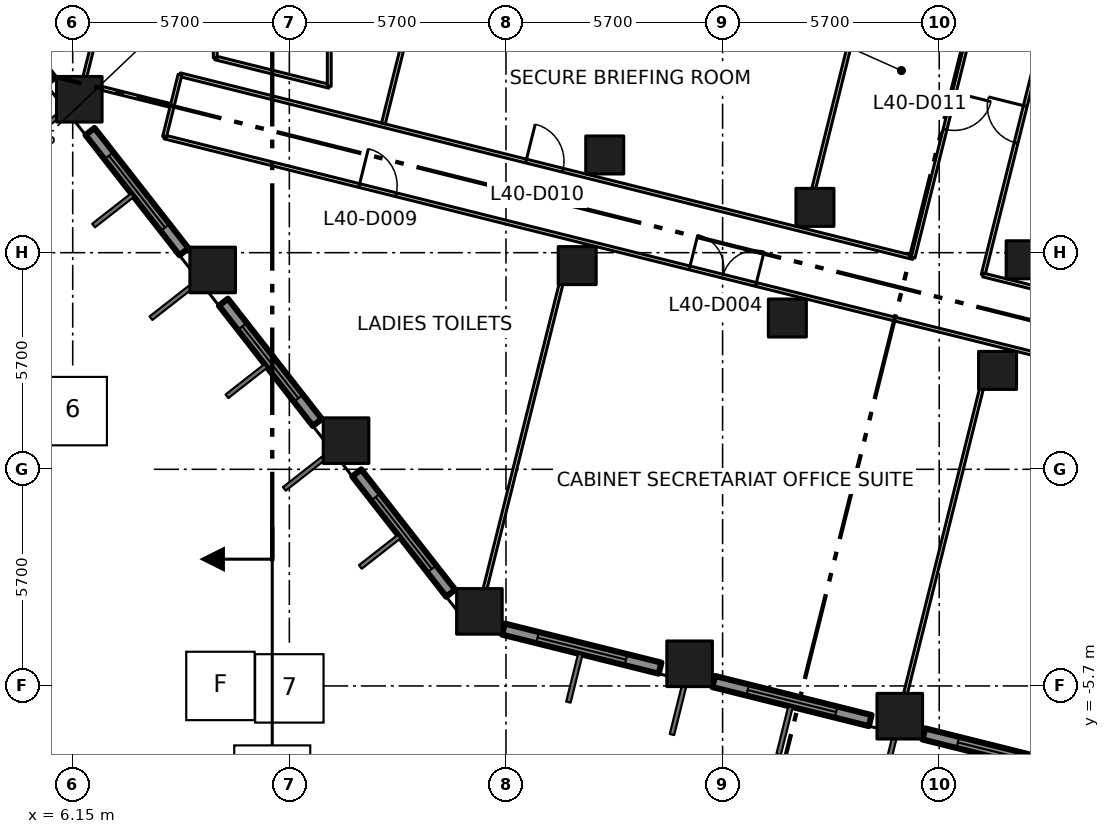
"""IFC4 building model, lengths in metres.
Left out: names, types, materials, properties, quantities, classifications, styles, units other than length and angle.
Written with IfcOpenShell. Run it as: python <this file> out.ifc"""

import sys

from ifc_helpers import new_model, si_unit, direction, frame, frame_2d, origin, origin_2d, place, context, subcontext, project, spatial, rectangle, extrude, element, fill, save


model = new_model("IFC4")
c1 = context("Model", 3, precision=1e-05, world=origin(), true_north=direction((0.0, 1.0)))
c2 = subcontext(c1, "Body", "Model", "MODEL_VIEW")
j1 = project(units=[si_unit("LENGTHUNIT", "METRE"), si_unit("PLANEANGLEUNIT", "RADIAN")], contexts=[c1])
p1 = place(None, origin())
s1 = spatial("IfcSite", under=j1, at=p1, CompositionType="ELEMENT")
p2 = place(p1, origin())
s2 = spatial("IfcBuilding", under=s1, at=p2, CompositionType="ELEMENT")
p3 = place(p2, frame((0.0, 0.0, 178.2)))
s3 = spatial("IfcBuildingStorey", under=s2, at=p3, CompositionType="ELEMENT", Elevation=178.2)
for number, where, z_axis, x_axis in (
    (1, (16.851, -3.738, 0.0), (0.0, 0.0, 1.0), (1.0, 0.0, 0.0)),
    (2, (13.342, 0.754, 0.0), (0.0, 0.0, 1.0), (1.0, 0.0, 0.0)),
    (3, (9.833, 5.245, 0.0), (0.0, 0.0, 1.0), (1.0, 0.0, 0.0)),
    (4, (6.323, 9.737, 0.0), (0.0, 0.0, 1.0), (1.0, 0.0, 0.0)),
    (5, (22.382, -5.117, 0.0), (0.0, 0.0, 1.0), (1.0, 0.0, 0.0)),
    (6, (27.912, -6.496, 0.0), (0.0, 0.0, 1.0), (1.0, 0.0, 0.0)),
):
    element("IfcColumn", number, at=place(p3, frame(where, z_axis=z_axis, x_axis=x_axis)), inside=s3, PredefinedType="COLUMN", context=c2, shape_type="SweptSolid", body=[
        extrude(rectangle(XDim=1.2, YDim=1.2, at=origin_2d()), origin(), (0.0, 0.0, 1.0), 4.2),
    ])
for number, where, z_axis, x_axis in (
    (7, (19.424, 5.36, 0.0), (0.0, 0.0, 1.0), (1.0, 0.0, 0.0)),
    (8, (24.954, 3.981, 0.0), (0.0, 0.0, 1.0), (1.0, 0.0, 0.0)),
    (9, (30.485, 2.602, 0.0), (0.0, 0.0, 1.0), (1.0, 0.0, 0.0)),
    (10, (20.149, 8.271, 0.0), (0.0, 0.0, 1.0), (1.0, 0.0, 0.0)),
    (11, (25.68, 6.892, 0.0), (0.0, 0.0, 1.0), (1.0, 0.0, 0.0)),
    (12, (31.211, 5.513, 0.0), (0.0, 0.0, 1.0), (1.0, 0.0, 0.0)),
):
    element("IfcColumn", number, at=place(p3, frame(where, z_axis=z_axis, x_axis=x_axis)), inside=s3, PredefinedType="COLUMN", context=c2, shape_type="SweptSolid", body=[
        extrude(rectangle(XDim=1.0, YDim=1.0, at=origin_2d()), origin(), (0.0, 0.0, 1.0), 4.2),
    ])
p4 = place(p3, frame((3.096, 13.381, 0.0), z_axis=(0.0, 0.0, 1.0), x_axis=(0.615563820493, -0.78808704018, 0.0)))
e13 = element("IfcWall", 13, at=p4, inside=s3, PredefinedType="SOLIDWALL", context=c2, shape_type="SweptSolid", body=[
    extrude(rectangle(XDim=4.016, YDim=0.3, at=frame_2d((2.008, 0.0))), origin(), (0.0, 0.0, 1.0), 3.15),
])
p5 = place(p4, frame((0.808, 0.0, 0.8)))
e14 = element("IfcOpeningElement", 14, at=p5, cuts=e13, PredefinedType="OPENING", context=c2, shape_type="SweptSolid", body=[
    extrude(rectangle(XDim=2.4, YDim=2.1, at=frame_2d((1.2, 1.05))), frame((0.0, 0.16, 0.0), z_axis=(0.0, -1.0, 0.0), x_axis=(1.0, 0.0, 0.0)), (0.0, 0.0, 1.0), 0.32),
])
p6 = place(p3, frame((6.605, 8.889, 0.0), z_axis=(0.0, 0.0, 1.0), x_axis=(0.615706559089, -0.787975528233, 0.0)))
e15 = element("IfcWall", 15, at=p6, inside=s3, PredefinedType="SOLIDWALL", context=c2, shape_type="SweptSolid", body=[
    extrude(rectangle(XDim=4.016, YDim=0.3, at=frame_2d((2.008, 0.0))), origin(), (0.0, 0.0, 1.0), 3.15),
])
p7 = place(p6, frame((0.808, 0.0, 0.8)))
e16 = element("IfcOpeningElement", 16, at=p7, cuts=e15, PredefinedType="OPENING", context=c2, shape_type="SweptSolid", body=[
    extrude(rectangle(XDim=2.4, YDim=2.1, at=frame_2d((1.2, 1.05))), frame((0.0, 0.16, 0.0), z_axis=(0.0, -1.0, 0.0), x_axis=(1.0, 0.0, 0.0)), (0.0, 0.0, 1.0), 0.32),
])
p8 = place(p3, frame((10.115, 4.397, 0.0), z_axis=(0.0, 0.0, 1.0), x_axis=(0.615644041972, -0.788024373725, 0.0)))
e17 = element("IfcWall", 17, at=p8, inside=s3, PredefinedType="SOLIDWALL", context=c2, shape_type="SweptSolid", body=[
    extrude(rectangle(XDim=4.015, YDim=0.3, at=frame_2d((2.008, 0.0))), origin(), (0.0, 0.0, 1.0), 3.15),
])
p9 = place(p8, frame((0.807, 0.0, 0.8)))
e18 = element("IfcOpeningElement", 18, at=p9, cuts=e17, PredefinedType="OPENING", context=c2, shape_type="SweptSolid", body=[
    extrude(rectangle(XDim=2.4, YDim=2.1, at=frame_2d((1.2, 1.05))), frame((0.0, 0.16, 0.0), z_axis=(0.0, -1.0, 0.0), x_axis=(1.0, 0.0, 0.0)), (0.0, 0.0, 1.0), 0.32),
])
p10 = place(p3, frame((13.624, -0.094, 0.0), z_axis=(0.0, 0.0, 1.0), x_axis=(0.615526062586, -0.7881165309, 0.0)))
e19 = element("IfcWall", 19, at=p10, inside=s3, PredefinedType="SOLIDWALL", context=c2, shape_type="SweptSolid", body=[
    extrude(rectangle(XDim=4.016, YDim=0.3, at=frame_2d((2.008, 0.0))), origin(), (0.0, 0.0, 1.0), 3.15),
])
p11 = place(p10, frame((0.808, 0.0, 0.8)))
e20 = element("IfcOpeningElement", 20, at=p11, cuts=e19, PredefinedType="OPENING", context=c2, shape_type="SweptSolid", body=[
    extrude(rectangle(XDim=2.4, YDim=2.1, at=frame_2d((1.2, 1.05))), frame((0.0, 0.16, 0.0), z_axis=(0.0, -1.0, 0.0), x_axis=(1.0, 0.0, 0.0)), (0.0, 0.0, 1.0), 0.32),
])
p12 = place(p3, frame((17.484, -4.205, 0.0), z_axis=(0.0, 0.0, 1.0), x_axis=(0.970318118028, -0.241832069473, 0.0)))
e21 = element("IfcWall", 21, at=p12, inside=s3, PredefinedType="SOLIDWALL", context=c2, shape_type="SweptSolid", body=[
    extrude(rectangle(XDim=4.246, YDim=0.3, at=frame_2d((2.123, 0.0))), origin(), (0.0, 0.0, 1.0), 3.15),
])
p13 = place(p12, frame((0.923, 0.0, 0.8)))
e22 = element("IfcOpeningElement", 22, at=p13, cuts=e21, PredefinedType="OPENING", context=c2, shape_type="SweptSolid", body=[
    extrude(rectangle(XDim=2.4, YDim=2.1, at=frame_2d((1.2, 1.05))), frame((0.0, 0.16, 0.0), z_axis=(0.0, -1.0, 0.0), x_axis=(1.0, 0.0, 0.0)), (0.0, 0.0, 1.0), 0.32),
])
p14 = place(p3, frame((23.015, -5.584, 0.0), z_axis=(0.0, 0.0, 1.0), x_axis=(0.970291164166, -0.241940192487, 0.0)))
e23 = element("IfcWall", 23, at=p14, inside=s3, PredefinedType="SOLIDWALL", context=c2, shape_type="SweptSolid", body=[
    extrude(rectangle(XDim=4.245, YDim=0.3, at=frame_2d((2.123, 0.0))), origin(), (0.0, 0.0, 1.0), 3.15),
])
p15 = place(p14, frame((0.922, 0.0, 0.8)))
e24 = element("IfcOpeningElement", 24, at=p15, cuts=e23, PredefinedType="OPENING", context=c2, shape_type="SweptSolid", body=[
    extrude(rectangle(XDim=2.4, YDim=2.1, at=frame_2d((1.2, 1.05))), frame((0.0, 0.16, 0.0), z_axis=(0.0, -1.0, 0.0), x_axis=(1.0, 0.0, 0.0)), (0.0, 0.0, 1.0), 0.32),
])
p16 = place(p3, frame((28.545, -6.963, 0.0), z_axis=(0.0, 0.0, 1.0), x_axis=(0.97030462482, -0.241886202691, 0.0)))
e25 = element("IfcWall", 25, at=p16, inside=s3, PredefinedType="SOLIDWALL", context=c2, shape_type="SweptSolid", body=[
    extrude(rectangle(XDim=4.246, YDim=0.3, at=frame_2d((2.123, 0.0))), origin(), (0.0, 0.0, 1.0), 3.15),
])
p17 = place(p16, frame((0.923, 0.0, 0.8)))
e26 = element("IfcOpeningElement", 26, at=p17, cuts=e25, PredefinedType="OPENING", context=c2, shape_type="SweptSolid", body=[
    extrude(rectangle(XDim=2.4, YDim=2.1, at=frame_2d((1.2, 1.05))), frame((0.0, 0.16, 0.0), z_axis=(0.0, -1.0, 0.0), x_axis=(1.0, 0.0, 0.0)), (0.0, 0.0, 1.0), 0.32),
])
p18 = place(p3, frame((8.565, 8.744, 0.0), z_axis=(0.0, 0.0, 1.0), x_axis=(0.97029693432, -0.24191705035, 0.0)))
e27 = element("IfcWall", 27, at=p18, inside=s3, PredefinedType="PARTITIONING", context=c2, shape_type="SweptSolid", body=[
    extrude(rectangle(XDim=56.375, YDim=0.1, at=frame_2d((28.187, 0.0))), origin(), (0.0, 0.0, 1.0), 3.9),
])
p19 = place(p18, frame((42.739, 0.0, 0.0)))
e28 = element("IfcOpeningElement", 28, at=p19, cuts=e27, PredefinedType="OPENING", context=c2, shape_type="SweptSolid", body=[
    extrude(rectangle(XDim=1.8, YDim=2.1, at=frame_2d((0.9, 1.05))), frame((0.0, 0.06, 0.0), z_axis=(0.0, -1.0, 0.0), x_axis=(1.0, 0.0, 0.0)), (0.0, 0.0, 1.0), 0.12),
])
p20 = place(p18, frame((14.239, 0.0, 0.0)))
e29 = element("IfcOpeningElement", 29, at=p20, cuts=e27, PredefinedType="OPENING", context=c2, shape_type="SweptSolid", body=[
    extrude(rectangle(XDim=1.8, YDim=2.1, at=frame_2d((0.9, 1.05))), frame((0.0, 0.06, 0.0), z_axis=(0.0, -1.0, 0.0), x_axis=(1.0, 0.0, 0.0)), (0.0, 0.0, 1.0), 0.12),
])
p21 = place(p18, frame((29.74, 0.0, 0.0)))
e30 = element("IfcOpeningElement", 30, at=p21, cuts=e27, PredefinedType="OPENING", context=c2, shape_type="SweptSolid", body=[
    extrude(rectangle(XDim=1.8, YDim=2.1, at=frame_2d((0.9, 1.05))), frame((0.0, 0.06, 0.0), z_axis=(0.0, -1.0, 0.0), x_axis=(1.0, 0.0, 0.0)), (0.0, 0.0, 1.0), 0.12),
])
p22 = place(p18, frame((35.64, 0.0, 0.0)))
e31 = element("IfcOpeningElement", 31, at=p22, cuts=e27, PredefinedType="OPENING", context=c2, shape_type="SweptSolid", body=[
    extrude(rectangle(XDim=1.0, YDim=2.1, at=frame_2d((0.5, 1.05))), frame((0.0, 0.06, 0.0), z_axis=(0.0, -1.0, 0.0), x_axis=(1.0, 0.0, 0.0)), (0.0, 0.0, 1.0), 0.12),
])
p23 = place(p18, frame((5.28, 0.0, 0.0)))
e32 = element("IfcOpeningElement", 32, at=p23, cuts=e27, PredefinedType="OPENING", context=c2, shape_type="SweptSolid", body=[
    extrude(rectangle(XDim=1.0, YDim=2.1, at=frame_2d((0.5, 1.05))), frame((0.0, 0.06, 0.0), z_axis=(0.0, -1.0, 0.0), x_axis=(1.0, 0.0, 0.0)), (0.0, 0.0, 1.0), 0.12),
])
p24 = place(p3, frame((8.973, 10.382, 0.0), z_axis=(0.0, 0.0, 1.0), x_axis=(0.970286808807, -0.241957658808, 0.0)))
e33 = element("IfcWall", 33, at=p24, inside=s3, PredefinedType="PARTITIONING", context=c2, shape_type="SweptSolid", body=[
    extrude(rectangle(XDim=19.88, YDim=0.1, at=frame_2d((9.94, 0.0))), origin(), (0.0, 0.0, 1.0), 3.9),
])
p25 = place(p24, frame((9.384, 0.0, 0.0)))
e34 = element("IfcOpeningElement", 34, at=p25, cuts=e33, PredefinedType="OPENING", context=c2, shape_type="SweptSolid", body=[
    extrude(rectangle(XDim=1.0, YDim=2.1, at=frame_2d((0.5, 1.05))), frame((0.0, 0.06, 0.0), z_axis=(0.0, -1.0, 0.0), x_axis=(1.0, 0.0, 0.0)), (0.0, 0.0, 1.0), 0.12),
])
p26 = place(p3, frame((8.973, 10.382, 0.0), z_axis=(0.0, 0.0, 1.0), x_axis=(-0.241650823739, -0.970363271866, 0.0)))
e35 = element("IfcWall", 35, at=p26, inside=s3, PredefinedType="PARTITIONING", context=c2, shape_type="SweptSolid", body=[
    extrude(rectangle(XDim=1.688, YDim=0.1, at=frame_2d((0.844, 0.0))), origin(), (0.0, 0.0, 1.0), 3.9),
])
p27 = place(p3, frame((9.9, 10.826, 0.0), z_axis=(0.0, 0.0, 1.0), x_axis=(0.970290953223, -0.241941038466, 0.0)))
e36 = element("IfcWall", 36, at=p27, inside=s3, PredefinedType="PARTITIONING", context=c2, shape_type="SweptSolid", body=[
    extrude(rectangle(XDim=3.092, YDim=0.1, at=frame_2d((1.546, 0.0))), origin(), (0.0, 0.0, 1.0), 3.9),
])
p28 = place(p3, frame((9.9, 12.2, 0.0), z_axis=(0.0, 0.0, 1.0), x_axis=(0.0, -1.0, 0.0)))
e37 = element("IfcWall", 37, at=p28, inside=s3, PredefinedType="PARTITIONING", context=c2, shape_type="SweptSolid", body=[
    extrude(rectangle(XDim=1.374, YDim=0.1, at=frame_2d((0.687, 0.0))), origin(), (0.0, 0.0, 1.0), 3.9),
])
p29 = place(p3, frame((12.9, 10.078, 0.0), z_axis=(0.0, 0.0, 1.0), x_axis=(0.0, 1.0, 0.0)))
e38 = element("IfcWall", 38, at=p29, inside=s3, PredefinedType="PARTITIONING", context=c2, shape_type="SweptSolid", body=[
    extrude(rectangle(XDim=4.022, YDim=0.1, at=frame_2d((2.011, 0.0))), origin(), (0.0, 0.0, 1.0), 3.9),
])
p30 = place(p3, frame((30.105, 5.113, 0.0), z_axis=(0.0, 0.0, 1.0), x_axis=(0.241984285369, 0.970280168629, 0.0)))
e39 = element("IfcWall", 39, at=p30, inside=s3, PredefinedType="PARTITIONING", context=c2, shape_type="SweptSolid", body=[
    extrude(rectangle(XDim=8.232, YDim=0.1, at=frame_2d((4.116, 0.0))), origin(), (0.0, 0.0, 1.0), 3.9),
])
p31 = place(p30, frame((3.58, 0.0, 0.0)))
e40 = element("IfcOpeningElement", 40, at=p31, cuts=e39, PredefinedType="OPENING", context=c2, shape_type="SweptSolid", body=[
    extrude(rectangle(XDim=1.0, YDim=2.1, at=frame_2d((0.5, 1.05))), frame((0.0, 0.06, 0.0), z_axis=(0.0, -1.0, 0.0), x_axis=(1.0, 0.0, 0.0)), (0.0, 0.0, 1.0), 0.12),
])
p32 = place(p3, frame((30.259, 13.583, 0.0), z_axis=(0.0, 0.0, 1.0), x_axis=(-0.241888494143, -0.970304053584, 0.0)))
e41 = element("IfcWall", 41, at=p32, inside=s3, PredefinedType="PARTITIONING", context=c2, shape_type="SweptSolid", body=[
    extrude(rectangle(XDim=8.256, YDim=0.1, at=frame_2d((4.128, 0.0))), origin(), (0.0, 0.0, 1.0), 3.9),
])
p33 = place(p32, frame((3.78, 0.0, 0.0)))
e42 = element("IfcOpeningElement", 42, at=p33, cuts=e41, PredefinedType="OPENING", context=c2, shape_type="SweptSolid", body=[
    extrude(rectangle(XDim=1.0, YDim=2.1, at=frame_2d((0.5, 1.05))), frame((0.0, 0.06, 0.0), z_axis=(0.0, -1.0, 0.0), x_axis=(1.0, 0.0, 0.0)), (0.0, 0.0, 1.0), 0.12),
])
p34 = place(p3, frame((49.536, 0.268, 0.0), z_axis=(0.0, 0.0, 1.0), x_axis=(-0.970292195994, 0.241936054348, 0.0)))
e43 = element("IfcWall", 43, at=p34, inside=s3, PredefinedType="PARTITIONING", context=c2, shape_type="SweptSolid", body=[
    extrude(rectangle(XDim=20.026, YDim=0.1, at=frame_2d((10.013, 0.0))), origin(), (0.0, 0.0, 1.0), 3.9),
])
p35 = place(p34, frame((9.18, 0.0, 0.0)))
e44 = element("IfcOpeningElement", 44, at=p35, cuts=e43, PredefinedType="OPENING", context=c2, shape_type="SweptSolid", body=[
    extrude(rectangle(XDim=1.8, YDim=2.1, at=frame_2d((0.9, 1.05))), frame((0.0, 0.06, 0.0), z_axis=(0.0, -1.0, 0.0), x_axis=(1.0, 0.0, 0.0)), (0.0, 0.0, 1.0), 0.12),
])
p36 = place(p3, frame((6.922, 12.138, 0.0), z_axis=(0.0, 0.0, 1.0), x_axis=(-0.242504681353, -0.970150235542, 0.0)))
e45 = element("IfcWall", 45, at=p36, inside=s3, PredefinedType="PARTITIONING", context=c2, shape_type="SweptSolid", body=[
    extrude(rectangle(XDim=1.856, YDim=0.1, at=frame_2d((0.928, 0.0))), origin(), (0.0, 0.0, 1.0), 3.9),
])
p37 = place(p3, frame((8.72, 9.574, 0.0), z_axis=(0.0, 0.0, 1.0), x_axis=(-0.97017350799, 0.242411559945, 0.0)))
e46 = element("IfcWall", 46, at=p37, inside=s3, PredefinedType="PARTITIONING", context=c2, shape_type="SweptSolid", body=[
    extrude(rectangle(XDim=1.852, YDim=0.1, at=frame_2d((0.926, 0.0))), origin(), (0.0, 0.0, 1.0), 3.9),
])
p38 = place(p3, frame((14.325, 9.099, 0.0), z_axis=(0.0, 0.0, 1.0), x_axis=(0.241956019685, 0.970287217548, 0.0)))
e47 = element("IfcWall", 47, at=p38, inside=s3, PredefinedType="PARTITIONING", context=c2, shape_type="SweptSolid", body=[
    extrude(rectangle(XDim=5.154, YDim=0.1, at=frame_2d((2.577, 0.0))), origin(), (0.0, 0.0, 1.0), 3.9),
])
p39 = place(p3, frame((17.001, -3.138, 0.0), z_axis=(0.0, 0.0, 1.0), x_axis=(0.241922303467, 0.970295624583, 0.0)))
e48 = element("IfcWall", 48, at=p39, inside=s3, PredefinedType="PARTITIONING", context=c2, shape_type="SweptSolid", body=[
    extrude(rectangle(XDim=8.243, YDim=0.1, at=frame_2d((4.122, 0.0))), origin(), (0.0, 0.0, 1.0), 3.9),
])
p40 = place(p3, frame((25.649, 7.392, 0.0), z_axis=(0.0, 0.0, 1.0), x_axis=(0.241870819599, 0.970308459525, 0.0)))
e49 = element("IfcWall", 49, at=p40, inside=s3, PredefinedType="PARTITIONING", context=c2, shape_type="SweptSolid", body=[
    extrude(rectangle(XDim=6.913, YDim=0.1, at=frame_2d((3.457, 0.0))), origin(), (0.0, 0.0, 1.0), 3.9),
])
p41 = place(p3, frame((28.063, -5.896, 0.0), z_axis=(0.0, 0.0, 1.0), x_axis=(0.241894418317, 0.970302576719, 0.0)))
e50 = element("IfcWall", 50, at=p41, inside=s3, PredefinedType="PARTITIONING", context=c2, shape_type="SweptSolid", body=[
    extrude(rectangle(XDim=8.243, YDim=0.1, at=frame_2d((4.122, 0.0))), origin(), (0.0, 0.0, 1.0), 3.9),
])
p42 = place(p7, origin())
e51 = element("IfcWindow", 51, at=p42, inside=s3, PartitioningType="DOUBLE_PANEL_VERTICAL", PredefinedType="WINDOW", context=c2, shape_type="SweptSolid", body=[
    extrude(rectangle(XDim=2.4, YDim=2.1, at=frame_2d((1.2, 1.05))), frame((0.0, 0.03, 0.0), z_axis=(0.0, -1.0, 0.0), x_axis=(1.0, 0.0, 0.0)), (0.0, 0.0, 1.0), 0.06),
])
fill(e16, e51)
p43 = place(p9, origin())
e52 = element("IfcWindow", 52, at=p43, inside=s3, PartitioningType="DOUBLE_PANEL_VERTICAL", PredefinedType="WINDOW", context=c2, shape_type="SweptSolid", body=[
    extrude(rectangle(XDim=2.4, YDim=2.1, at=frame_2d((1.2, 1.05))), frame((0.0, 0.03, 0.0), z_axis=(0.0, -1.0, 0.0), x_axis=(1.0, 0.0, 0.0)), (0.0, 0.0, 1.0), 0.06),
])
fill(e18, e52)
p44 = place(p11, origin())
e53 = element("IfcWindow", 53, at=p44, inside=s3, PartitioningType="DOUBLE_PANEL_VERTICAL", PredefinedType="WINDOW", context=c2, shape_type="SweptSolid", body=[
    extrude(rectangle(XDim=2.4, YDim=2.1, at=frame_2d((1.2, 1.05))), frame((0.0, 0.03, 0.0), z_axis=(0.0, -1.0, 0.0), x_axis=(1.0, 0.0, 0.0)), (0.0, 0.0, 1.0), 0.06),
])
fill(e20, e53)
p45 = place(p13, origin())
e54 = element("IfcWindow", 54, at=p45, inside=s3, PartitioningType="DOUBLE_PANEL_VERTICAL", PredefinedType="WINDOW", context=c2, shape_type="SweptSolid", body=[
    extrude(rectangle(XDim=2.4, YDim=2.1, at=frame_2d((1.2, 1.05))), frame((0.0, 0.03, 0.0), z_axis=(0.0, -1.0, 0.0), x_axis=(1.0, 0.0, 0.0)), (0.0, 0.0, 1.0), 0.06),
])
fill(e22, e54)
p46 = place(p15, origin())
e55 = element("IfcWindow", 55, at=p46, inside=s3, PartitioningType="DOUBLE_PANEL_VERTICAL", PredefinedType="WINDOW", context=c2, shape_type="SweptSolid", body=[
    extrude(rectangle(XDim=2.4, YDim=2.1, at=frame_2d((1.2, 1.05))), frame((0.0, 0.03, 0.0), z_axis=(0.0, -1.0, 0.0), x_axis=(1.0, 0.0, 0.0)), (0.0, 0.0, 1.0), 0.06),
])
fill(e24, e55)
p47 = place(p17, origin())
e56 = element("IfcWindow", 56, at=p47, inside=s3, PartitioningType="DOUBLE_PANEL_VERTICAL", PredefinedType="WINDOW", context=c2, shape_type="SweptSolid", body=[
    extrude(rectangle(XDim=2.4, YDim=2.1, at=frame_2d((1.2, 1.05))), frame((0.0, 0.03, 0.0), z_axis=(0.0, -1.0, 0.0), x_axis=(1.0, 0.0, 0.0)), (0.0, 0.0, 1.0), 0.06),
])
fill(e26, e56)
p48 = place(p20, origin())
e57 = element("IfcDoor", 57, at=p48, inside=s3, OperationType="DOUBLE_DOOR_SINGLE_SWING", PredefinedType="DOOR", context=c2, shape_type="SweptSolid", body=[
    extrude(rectangle(XDim=1.8, YDim=2.1, at=frame_2d((0.9, 1.05))), frame((0.0, 0.025, 0.0), z_axis=(0.0, -1.0, 0.0), x_axis=(1.0, 0.0, 0.0)), (0.0, 0.0, 1.0), 0.05),
])
fill(e29, e57)
p49 = place(p23, origin())
e58 = element("IfcDoor", 58, at=p49, inside=s3, OperationType="SINGLE_SWING_LEFT", PredefinedType="DOOR", context=c2, shape_type="SweptSolid", body=[
    extrude(rectangle(XDim=1.0, YDim=2.1, at=frame_2d((0.5, 1.05))), frame((0.0, 0.025, 0.0), z_axis=(0.0, -1.0, 0.0), x_axis=(1.0, 0.0, 0.0)), (0.0, 0.0, 1.0), 0.05),
])
fill(e32, e58)
p50 = place(p25, origin())
e59 = element("IfcDoor", 59, at=p50, inside=s3, OperationType="SINGLE_SWING_LEFT", PredefinedType="DOOR", context=c2, shape_type="SweptSolid", body=[
    extrude(rectangle(XDim=1.0, YDim=2.1, at=frame_2d((0.5, 1.05))), frame((0.0, 0.025, 0.0), z_axis=(0.0, -1.0, 0.0), x_axis=(1.0, 0.0, 0.0)), (0.0, 0.0, 1.0), 0.05),
])
fill(e34, e59)
p51 = place(p33, origin())
e60 = element("IfcDoor", 60, at=p51, inside=s3, OperationType="SINGLE_SWING_LEFT", PredefinedType="DOOR", context=c2, shape_type="SweptSolid", body=[
    extrude(rectangle(XDim=1.0, YDim=2.1, at=frame_2d((0.5, 1.05))), frame((0.0, 0.025, 0.0), z_axis=(0.0, -1.0, 0.0), x_axis=(1.0, 0.0, 0.0)), (0.0, 0.0, 1.0), 0.05),
])
fill(e42, e60)
p52 = place(p31, origin())
e61 = element("IfcDoor", 61, at=p52, inside=s3, OperationType="SINGLE_SWING_RIGHT", PredefinedType="DOOR", context=c2, shape_type="SweptSolid", body=[
    extrude(rectangle(XDim=1.0, YDim=2.1, at=frame_2d((0.5, 1.05))), frame((0.0, 0.025, 0.0), z_axis=(0.0, -1.0, 0.0), x_axis=(1.0, 0.0, 0.0)), (0.0, 0.0, 1.0), 0.05),
])
fill(e40, e61)
save(model, sys.argv[1])
